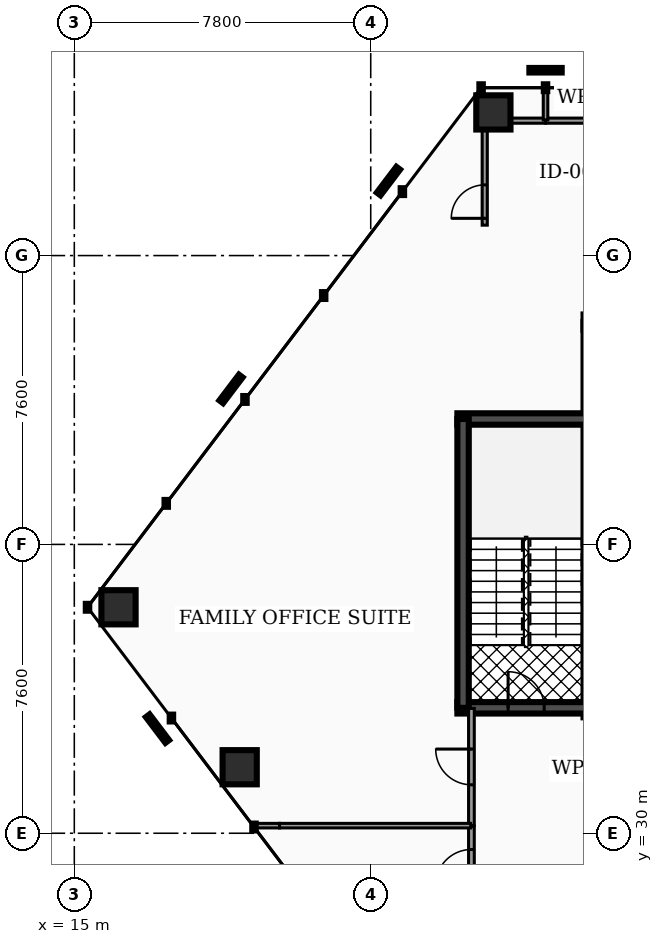
"""IFC4 building model, lengths in metres.
Left out: names, types, materials, properties, quantities, classifications, styles, units other than length and angle.
Written with IfcOpenShell. Run it as: python <this file> out.ifc"""

import sys

from ifc_helpers import new_model, si_unit, direction, frame, frame_2d, origin, origin_2d, place, context, subcontext, project, spatial, rectangle, hollow_rectangle, extrude, element, fill, save


model = new_model("IFC4")
c1 = context("Model", 3, precision=1e-05, world=origin(), true_north=direction((0.0, 1.0)))
c2 = subcontext(c1, "Body", "Model", "MODEL_VIEW")
j1 = project(units=[si_unit("LENGTHUNIT", "METRE"), si_unit("PLANEANGLEUNIT", "RADIAN")], contexts=[c1])
p1 = place(None, origin())
s1 = spatial("IfcSite", under=j1, at=p1, CompositionType="ELEMENT")
p2 = place(p1, origin())
s2 = spatial("IfcBuilding", under=s1, at=p2, CompositionType="ELEMENT")
p3 = place(p2, frame((0.0, 0.0, 88.74)))
s3 = spatial("IfcBuildingStorey", under=s2, at=p3, CompositionType="ELEMENT", Elevation=88.74)
p4 = place(p3, frame((25.08, 40.9, 0.0), z_axis=(0.0, 0.0, 1.0), x_axis=(1.0, 0.0, 0.0)))
e1 = element("IfcWall", 1, at=p4, inside=s3, PredefinedType="SHEAR", context=c2, shape_type="SweptSolid", body=[
    extrude(rectangle(XDim=3.52, YDim=0.3, at=frame_2d((1.76, 0.0))), origin(), (0.0, 0.0, 1.0), 3.82),
])
p5 = place(p3, frame((25.08, 33.3, 0.0), z_axis=(0.0, 0.0, 1.0), x_axis=(1.0, 0.0, 0.0)))
e2 = element("IfcWall", 2, at=p5, inside=s3, PredefinedType="SHEAR", context=c2, shape_type="SweptSolid", body=[
    extrude(rectangle(XDim=3.52, YDim=0.3, at=frame_2d((1.76, 0.0))), origin(), (0.0, 0.0, 1.0), 3.82),
])
p6 = place(p5, frame((1.335, 0.0, 0.0)))
e3 = element("IfcOpeningElement", 3, at=p6, cuts=e2, PredefinedType="OPENING", context=c2, shape_type="SweptSolid", body=[
    extrude(rectangle(XDim=0.95, YDim=2.2, at=frame_2d((0.475, 1.1))), frame((0.0, 0.16, 0.0), z_axis=(0.0, -1.0, 0.0), x_axis=(1.0, 0.0, 0.0)), (0.0, 0.0, 1.0), 0.32),
])
p7 = place(p3, frame((25.23, 33.3, 0.0), z_axis=(0.0, 0.0, 1.0), x_axis=(0.0, 1.0, 0.0)))
e4 = element("IfcWall", 4, at=p7, inside=s3, PredefinedType="SHEAR", context=c2, shape_type="SweptSolid", body=[
    extrude(rectangle(XDim=7.6, YDim=0.3, at=frame_2d((3.8, 0.0))), origin(), (0.0, 0.0, 1.0), 3.82),
])
for number, where, z_axis, x_axis in (
    (5, (26.028, 48.967, 0.0), (0.0, 0.0, 1.0), (1.0, 0.0, 0.0)),
    (6, (16.163, 35.946, 0.0), (0.0, 0.0, 1.0), (1.0, 0.0, 0.0)),
    (7, (19.352, 31.737, 0.0), (0.0, 0.0, 1.0), (1.0, 0.0, 0.0)),
):
    element("IfcColumn", number, at=place(p3, frame(where, z_axis=z_axis, x_axis=x_axis)), inside=s3, PredefinedType="COLUMN", context=c2, shape_type="SweptSolid", body=[
        extrude(hollow_rectangle(XDim=0.9, YDim=0.9, WallThickness=0.045, at=origin_2d()), origin(), (0.0, 0.0, 1.0), 3.82),
    ])
p8 = place(p3, frame((25.45, 28.02, 0.0), z_axis=(0.0, 0.0, 1.0), x_axis=(0.0, 1.0, 0.0)))
e8 = element("IfcWall", 8, at=p8, inside=s3, PredefinedType="PARTITIONING", context=c2, shape_type="SweptSolid", body=[
    extrude(rectangle(XDim=2.165, YDim=0.15, at=frame_2d((1.083, 0.0))), origin(), (0.0, 0.0, 1.0), 2.777),
])
p9 = place(p8, frame((0.613, 0.0, 0.0)))
e9 = element("IfcOpeningElement", 9, at=p9, cuts=e8, PredefinedType="OPENING", context=c2, shape_type="SweptSolid", body=[
    extrude(rectangle(XDim=0.94, YDim=2.05, at=frame_2d((0.47, 1.025))), frame((0.0, 0.085, 0.0), z_axis=(0.0, -1.0, 0.0), x_axis=(1.0, 0.0, 0.0)), (0.0, 0.0, 1.0), 0.17),
])
p10 = place(p3, frame((25.45, 30.205, 0.0), z_axis=(0.0, 0.0, 1.0), x_axis=(0.0, 1.0, 0.0)))
e10 = element("IfcWall", 10, at=p10, inside=s3, PredefinedType="PARTITIONING", context=c2, shape_type="SweptSolid", body=[
    extrude(rectangle(XDim=3.08, YDim=0.15, at=frame_2d((1.54, 0.0))), origin(), (0.0, 0.0, 1.0), 2.777),
])
p11 = place(p10, frame((1.07, 0.0, 0.0)))
e11 = element("IfcOpeningElement", 11, at=p11, cuts=e10, PredefinedType="OPENING", context=c2, shape_type="SweptSolid", body=[
    extrude(rectangle(XDim=0.94, YDim=2.05, at=frame_2d((0.47, 1.025))), frame((0.0, 0.085, 0.0), z_axis=(0.0, -1.0, 0.0), x_axis=(1.0, 0.0, 0.0)), (0.0, 0.0, 1.0), 0.17),
])
p12 = place(p3, frame((27.405, 48.75, 0.0), z_axis=(0.0, 0.0, 1.0), x_axis=(1.0, 0.0, 0.0)))
e12 = element("IfcWall", 12, at=p12, inside=s3, PredefinedType="PARTITIONING", context=c2, shape_type="SweptSolid", body=[
    extrude(rectangle(XDim=2.575, YDim=0.135, at=frame_2d((1.288, 0.0))), origin(), (0.0, 0.0, 1.0), 2.777),
])
p13 = place(p3, frame((25.8, 46.0, 0.0), z_axis=(0.0, 0.0, 1.0), x_axis=(0.0, 1.0, 0.0)))
e13 = element("IfcWall", 13, at=p13, inside=s3, PredefinedType="PARTITIONING", context=c2, shape_type="SweptSolid", body=[
    extrude(rectangle(XDim=2.584, YDim=0.135, at=frame_2d((1.292, 0.0))), origin(), (0.0, 0.0, 1.0), 2.777),
])
p14 = place(p13, frame((0.18, 0.0, 0.0)))
e14 = element("IfcOpeningElement", 14, at=p14, cuts=e13, PredefinedType="OPENING", context=c2, shape_type="SweptSolid", body=[
    extrude(rectangle(XDim=0.88, YDim=2.05, at=frame_2d((0.44, 1.025))), frame((0.0, 0.077, 0.0), z_axis=(0.0, -1.0, 0.0), x_axis=(1.0, 0.0, 0.0)), (0.0, 0.0, 1.0), 0.155),
])
p15 = place(p3, frame((25.966, 48.75, 0.0), z_axis=(0.0, 0.0, 1.0), x_axis=(1.0, 0.0, 0.0)))
e15 = element("IfcWall", 15, at=p15, inside=s3, PredefinedType="PARTITIONING", context=c2, shape_type="SweptSolid", body=[
    extrude(rectangle(XDim=1.429, YDim=0.135, at=frame_2d((0.715, 0.0))), origin(), (0.0, 0.0, 1.0), 2.777),
])
p16 = place(p3, frame((27.4, 48.77, 0.0), z_axis=(0.0, 0.0, 1.0), x_axis=(0.0, 1.0, 0.0)))
e16 = element("IfcWall", 16, at=p16, inside=s3, PredefinedType="PARTITIONING", context=c2, shape_type="SweptSolid", body=[
    extrude(rectangle(XDim=0.832, YDim=0.12, at=frame_2d((0.416, 0.0))), origin(), (0.0, 0.0, 1.0), 2.777),
])
p17 = place(p3, frame((19.716, 30.2, 0.0), z_axis=(0.0, 0.0, 1.0), x_axis=(1.0, 0.0, 0.0)))
e17 = element("IfcWall", 17, at=p17, inside=s3, PredefinedType="PARTITIONING", context=c2, shape_type="SweptSolid", body=[
    extrude(rectangle(XDim=0.684, YDim=0.12, at=frame_2d((0.342, 0.0))), origin(), (0.0, 0.0, 1.0), 2.777),
])
p18 = place(p3, frame((20.4, 30.2, 0.0), z_axis=(0.0, 0.0, 1.0), x_axis=(1.0, 0.0, 0.0)))
e18 = element("IfcWall", 18, at=p18, inside=s3, PredefinedType="PARTITIONING", context=c2, shape_type="SweptSolid", body=[
    extrude(rectangle(XDim=5.03, YDim=0.12, at=frame_2d((2.515, 0.0))), origin(), (0.0, 0.0, 1.0), 2.777),
])
p19 = place(p6, origin())
e19 = element("IfcDoor", 19, at=p19, inside=s3, OperationType="SINGLE_SWING_LEFT", PredefinedType="DOOR", context=c2, shape_type="SweptSolid", body=[
    extrude(rectangle(XDim=0.95, YDim=2.2, at=frame_2d((0.475, 1.1))), frame((0.0, 0.025, 0.0), z_axis=(0.0, -1.0, 0.0), x_axis=(1.0, 0.0, 0.0)), (0.0, 0.0, 1.0), 0.05),
])
fill(e3, e19)
p20 = place(p9, origin())
e20 = element("IfcDoor", 20, at=p20, inside=s3, OperationType="SINGLE_SWING_LEFT", PredefinedType="DOOR", context=c2, shape_type="SweptSolid", body=[
    extrude(rectangle(XDim=0.94, YDim=2.05, at=frame_2d((0.47, 1.025))), frame((0.0, 0.025, 0.0), z_axis=(0.0, -1.0, 0.0), x_axis=(1.0, 0.0, 0.0)), (0.0, 0.0, 1.0), 0.05),
])
fill(e9, e20)
p21 = place(p11, origin())
e21 = element("IfcDoor", 21, at=p21, inside=s3, OperationType="SINGLE_SWING_RIGHT", PredefinedType="DOOR", context=c2, shape_type="SweptSolid", body=[
    extrude(rectangle(XDim=0.94, YDim=2.05, at=frame_2d((0.47, 1.025))), frame((0.0, 0.025, 0.0), z_axis=(0.0, -1.0, 0.0), x_axis=(1.0, 0.0, 0.0)), (0.0, 0.0, 1.0), 0.05),
])
fill(e11, e21)
p22 = place(p14, origin())
e22 = element("IfcDoor", 22, at=p22, inside=s3, OperationType="SINGLE_SWING_LEFT", PredefinedType="DOOR", context=c2, shape_type="SweptSolid", body=[
    extrude(rectangle(XDim=0.88, YDim=2.05, at=frame_2d((0.44, 1.025))), frame((0.0, 0.025, 0.0), z_axis=(0.0, -1.0, 0.0), x_axis=(1.0, 0.0, 0.0)), (0.0, 0.0, 1.0), 0.05),
])
fill(e14, e22)
save(model, sys.argv[1])
